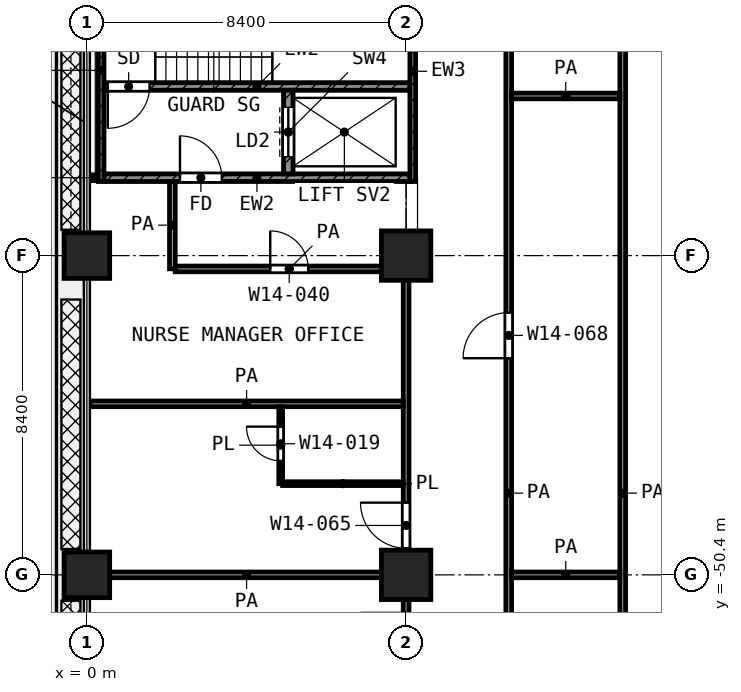
"""IFC4 building model, lengths in metres.
Left out: names, types, materials, properties, quantities, classifications, styles, units other than length and angle.
Written with IfcOpenShell. Run it as: python <this file> out.ifc"""

import sys

from ifc_helpers import new_model, si_unit, direction, frame, frame_2d, origin, origin_2d, place, context, subcontext, project, spatial, rectangle, extrude, element, fill, save


model = new_model("IFC4")
c1 = context("Model", 3, precision=1e-05, world=origin(), true_north=direction((0.0, 1.0)))
c2 = subcontext(c1, "Body", "Model", "MODEL_VIEW")
j1 = project(units=[si_unit("LENGTHUNIT", "METRE"), si_unit("PLANEANGLEUNIT", "RADIAN")], contexts=[c1])
p1 = place(None, origin())
s1 = spatial("IfcSite", under=j1, at=p1, CompositionType="ELEMENT")
p2 = place(p1, origin())
s2 = spatial("IfcBuilding", under=s1, at=p2, CompositionType="ELEMENT")
p3 = place(p2, frame((0.0, 0.0, 64.4)))
s3 = spatial("IfcBuildingStorey", under=s2, at=p3, CompositionType="ELEMENT", Elevation=64.4)
p4 = place(p3, frame((0.0, -42.0, 0.0), z_axis=(0.0, 0.0, 1.0), x_axis=(1.0, 0.0, 0.0)))
e1 = element("IfcColumn", 1, at=p4, inside=s3, PredefinedType="COLUMN", context=c2, shape_type="SweptSolid", body=[
    extrude(rectangle(XDim=1.2, YDim=1.2, at=origin_2d()), origin(), (0.0, 0.0, 1.0), 4.2),
])
p5 = place(p3, frame((8.4, -42.0, 0.0), z_axis=(0.0, 0.0, 1.0), x_axis=(1.0, 0.0, 0.0)))
e2 = element("IfcColumn", 2, at=p5, inside=s3, PredefinedType="COLUMN", context=c2, shape_type="SweptSolid", body=[
    extrude(rectangle(XDim=1.3, YDim=1.3, at=origin_2d()), origin(), (0.0, 0.0, 1.0), 4.2),
])
p6 = place(p3, frame((0.0, -50.4, 0.0), z_axis=(0.0, 0.0, 1.0), x_axis=(1.0, 0.0, 0.0)))
e3 = element("IfcColumn", 3, at=p6, inside=s3, PredefinedType="COLUMN", context=c2, shape_type="SweptSolid", body=[
    extrude(rectangle(XDim=1.2, YDim=1.2, at=origin_2d()), origin(), (0.0, 0.0, 1.0), 4.2),
])
p7 = place(p3, frame((8.4, -50.4, 0.0), z_axis=(0.0, 0.0, 1.0), x_axis=(1.0, 0.0, 0.0)))
e4 = element("IfcColumn", 4, at=p7, inside=s3, PredefinedType="COLUMN", context=c2, shape_type="SweptSolid", body=[
    extrude(rectangle(XDim=1.3, YDim=1.3, at=origin_2d()), origin(), (0.0, 0.0, 1.0), 4.2),
])
p8 = place(p3, frame((0.375, -40.05, 0.0), z_axis=(0.0, 0.0, 1.0), x_axis=(0.0, 1.0, 0.0)))
e5 = element("IfcWall", 5, at=p8, inside=s3, PredefinedType="SHEAR", context=c2, shape_type="SweptSolid", body=[
    extrude(rectangle(XDim=5.85, YDim=0.15, at=frame_2d((2.925, 0.0))), origin(), (0.0, 0.0, 1.0), 3.9),
])
p9 = place(p3, frame((8.575, -40.05, 0.0), z_axis=(0.0, 0.0, 1.0), x_axis=(0.0, 1.0, 0.0)))
e6 = element("IfcWall", 6, at=p9, inside=s3, PredefinedType="SHEAR", context=c2, shape_type="SweptSolid", body=[
    extrude(rectangle(XDim=5.8, YDim=0.15, at=frame_2d((2.9, 0.0))), origin(), (0.0, 0.0, 1.0), 3.9),
])
p10 = place(p3, frame((0.45, -37.55, 0.0), z_axis=(0.0, 0.0, 1.0), x_axis=(1.0, 0.0, 0.0)))
e7 = element("IfcWall", 7, at=p10, inside=s3, PredefinedType="SHEAR", context=c2, shape_type="SweptSolid", body=[
    extrude(rectangle(XDim=8.05, YDim=0.2, at=frame_2d((4.025, 0.0))), origin(), (0.0, 0.0, 1.0), 3.9),
])
p11 = place(p10, frame((0.1, 0.0, 0.0)))
e8 = element("IfcOpeningElement", 8, at=p11, cuts=e7, PredefinedType="OPENING", context=c2, shape_type="SweptSolid", body=[
    extrude(rectangle(XDim=1.1, YDim=2.1, at=frame_2d((0.55, 1.05))), frame((0.0, 0.11, 0.0), z_axis=(0.0, -1.0, 0.0), x_axis=(1.0, 0.0, 0.0)), (0.0, 0.0, 1.0), 0.22),
])
p12 = place(p3, frame((0.45, -39.95, 0.0), z_axis=(0.0, 0.0, 1.0), x_axis=(1.0, 0.0, 0.0)))
e9 = element("IfcWall", 9, at=p12, inside=s3, PredefinedType="SHEAR", context=c2, shape_type="SweptSolid", body=[
    extrude(rectangle(XDim=8.05, YDim=0.2, at=frame_2d((4.025, 0.0))), origin(), (0.0, 0.0, 1.0), 3.9),
])
p13 = place(p12, frame((2.0, 0.0, 0.0)))
e10 = element("IfcOpeningElement", 10, at=p13, cuts=e9, PredefinedType="OPENING", context=c2, shape_type="SweptSolid", body=[
    extrude(rectangle(XDim=1.1, YDim=2.1, at=frame_2d((0.55, 1.05))), frame((0.0, 0.11, 0.0), z_axis=(0.0, -1.0, 0.0), x_axis=(1.0, 0.0, 0.0)), (0.0, 0.0, 1.0), 0.22),
])
p14 = place(p3, frame((5.3, -39.85, 0.0), z_axis=(0.0, 0.0, 1.0), x_axis=(0.0, 1.0, 0.0)))
e11 = element("IfcWall", 11, at=p14, inside=s3, PredefinedType="SHEAR", context=c2, shape_type="SweptSolid", body=[
    extrude(rectangle(XDim=2.2, YDim=0.25, at=frame_2d((1.1, 0.0))), origin(), (0.0, 0.0, 1.0), 3.9),
])
p15 = place(p14, frame((0.45, 0.0, 0.0)))
e12 = element("IfcOpeningElement", 12, at=p15, cuts=e11, PredefinedType="OPENING", context=c2, shape_type="SweptSolid", body=[
    extrude(rectangle(XDim=1.3, YDim=2.1, at=frame_2d((0.65, 1.05))), frame((0.0, 0.135, 0.0), z_axis=(0.0, -1.0, 0.0), x_axis=(1.0, 0.0, 0.0)), (0.0, 0.0, 1.0), 0.27),
])
p16 = place(p3, frame((5.15, -48.0, 0.0), z_axis=(0.0, 0.0, 1.0), x_axis=(1.0, 0.0, 0.0)))
e13 = element("IfcWall", 13, at=p16, inside=s3, PredefinedType="PARTITIONING", context=c2, shape_type="SweptSolid", body=[
    extrude(rectangle(XDim=3.175, YDim=0.1, at=frame_2d((1.587, 0.0))), origin(), (0.0, 0.0, 1.0), 3.9),
])
p17 = place(p3, frame((5.1, -48.0, 0.0), z_axis=(0.0, 0.0, 1.0), x_axis=(0.0, 1.0, 0.0)))
e14 = element("IfcWall", 14, at=p17, inside=s3, PredefinedType="PARTITIONING", context=c2, shape_type="SweptSolid", body=[
    extrude(rectangle(XDim=2.025, YDim=0.1, at=frame_2d((1.012, 0.0))), origin(), (0.0, 0.0, 1.0), 3.9),
])
p18 = place(p17, frame((0.6, 0.0, 0.0)))
e15 = element("IfcOpeningElement", 15, at=p18, cuts=e14, PredefinedType="OPENING", context=c2, shape_type="SweptSolid", body=[
    extrude(rectangle(XDim=0.9, YDim=2.1, at=frame_2d((0.45, 1.05))), frame((0.0, 0.06, 0.0), z_axis=(0.0, -1.0, 0.0), x_axis=(1.0, 0.0, 0.0)), (0.0, 0.0, 1.0), 0.12),
])
p19 = place(p3, frame((0.08, -50.4, 0.0), z_axis=(0.0, 0.0, 1.0), x_axis=(1.0, 0.0, 0.0)))
e16 = element("IfcWall", 16, at=p19, inside=s3, PredefinedType="PARTITIONING", context=c2, shape_type="SweptSolid", body=[
    extrude(rectangle(XDim=8.245, YDim=0.15, at=frame_2d((4.123, 0.0))), origin(), (0.0, 0.0, 1.0), 3.9),
])
p20 = place(p3, frame((11.175, -50.4, 0.0), z_axis=(0.0, 0.0, 1.0), x_axis=(1.0, 0.0, 0.0)))
e17 = element("IfcWall", 17, at=p20, inside=s3, PredefinedType="PARTITIONING", context=c2, shape_type="SweptSolid", body=[
    extrude(rectangle(XDim=2.85, YDim=0.15, at=frame_2d((1.425, 0.0))), origin(), (0.0, 0.0, 1.0), 3.9),
])
p21 = place(p3, frame((0.08, -45.9, 0.0), z_axis=(0.0, 0.0, 1.0), x_axis=(1.0, 0.0, 0.0)))
e18 = element("IfcWall", 18, at=p21, inside=s3, PredefinedType="PARTITIONING", context=c2, shape_type="SweptSolid", body=[
    extrude(rectangle(XDim=8.245, YDim=0.15, at=frame_2d((4.123, 0.0))), origin(), (0.0, 0.0, 1.0), 3.9),
])
p22 = place(p3, frame((2.326, -42.35, 0.0), z_axis=(0.0, 0.0, 1.0), x_axis=(1.0, 0.0, 0.0)))
e19 = element("IfcWall", 19, at=p22, inside=s3, PredefinedType="PARTITIONING", context=c2, shape_type="SweptSolid", body=[
    extrude(rectangle(XDim=5.999, YDim=0.15, at=frame_2d((3.0, 0.0))), origin(), (0.0, 0.0, 1.0), 3.9),
])
p23 = place(p22, frame((2.499, 0.0, 0.0)))
e20 = element("IfcOpeningElement", 20, at=p23, cuts=e19, PredefinedType="OPENING", context=c2, shape_type="SweptSolid", body=[
    extrude(rectangle(XDim=1.0, YDim=2.1, at=frame_2d((0.5, 1.05))), frame((0.0, 0.085, 0.0), z_axis=(0.0, -1.0, 0.0), x_axis=(1.0, 0.0, 0.0)), (0.0, 0.0, 1.0), 0.17),
])
p24 = place(p3, frame((0.08, -39.95, 0.0), z_axis=(0.0, 0.0, 1.0), x_axis=(1.0, 0.0, 0.0)))
e21 = element("IfcWall", 21, at=p24, inside=s3, PredefinedType="PARTITIONING", context=c2, shape_type="SweptSolid", body=[
    extrude(rectangle(XDim=0.19, YDim=0.15, at=frame_2d((0.095, 0.0))), origin(), (0.0, 0.0, 1.0), 3.9),
])
p25 = place(p3, frame((11.175, -37.8, 0.0), z_axis=(0.0, 0.0, 1.0), x_axis=(1.0, 0.0, 0.0)))
e22 = element("IfcWall", 22, at=p25, inside=s3, PredefinedType="PARTITIONING", context=c2, shape_type="SweptSolid", body=[
    extrude(rectangle(XDim=2.85, YDim=0.15, at=frame_2d((1.425, 0.0))), origin(), (0.0, 0.0, 1.0), 3.9),
])
p26 = place(p3, frame((2.25, -42.348, 0.0), z_axis=(0.0, 0.0, 1.0), x_axis=(0.0, 1.0, 0.0)))
e23 = element("IfcWall", 23, at=p26, inside=s3, PredefinedType="PARTITIONING", context=c2, shape_type="SweptSolid", body=[
    extrude(rectangle(XDim=2.298, YDim=0.15, at=frame_2d((1.149, 0.0))), origin(), (0.0, 0.0, 1.0), 3.9),
])
p27 = place(p3, frame((8.4, -71.32, 0.0), z_axis=(0.0, 0.0, 1.0), x_axis=(0.0, 1.0, 0.0)))
e24 = element("IfcWall", 24, at=p27, inside=s3, PredefinedType="PARTITIONING", context=c2, shape_type="SweptSolid", body=[
    extrude(rectangle(XDim=28.97, YDim=0.15, at=frame_2d((14.485, 0.0))), origin(), (0.0, 0.0, 1.0), 3.9),
])
p28 = place(p27, frame((21.62, 0.0, 0.0)))
e25 = element("IfcOpeningElement", 25, at=p28, cuts=e24, PredefinedType="OPENING", context=c2, shape_type="SweptSolid", body=[
    extrude(rectangle(XDim=1.2, YDim=2.1, at=frame_2d((0.6, 1.05))), frame((0.0, 0.085, 0.0), z_axis=(0.0, -1.0, 0.0), x_axis=(1.0, 0.0, 0.0)), (0.0, 0.0, 1.0), 0.17),
])
p29 = place(p27, frame((18.72, 0.0, 0.0)))
e26 = element("IfcOpeningElement", 26, at=p29, cuts=e24, PredefinedType="OPENING", context=c2, shape_type="SweptSolid", body=[
    extrude(rectangle(XDim=1.2, YDim=2.1, at=frame_2d((0.6, 1.05))), frame((0.0, 0.085, 0.0), z_axis=(0.0, -1.0, 0.0), x_axis=(1.0, 0.0, 0.0)), (0.0, 0.0, 1.0), 0.17),
])
p30 = place(p27, frame((10.12, 0.0, 0.0)))
e27 = element("IfcOpeningElement", 27, at=p30, cuts=e24, PredefinedType="OPENING", context=c2, shape_type="SweptSolid", body=[
    extrude(rectangle(XDim=1.2, YDim=2.1, at=frame_2d((0.6, 1.05))), frame((0.0, 0.085, 0.0), z_axis=(0.0, -1.0, 0.0), x_axis=(1.0, 0.0, 0.0)), (0.0, 0.0, 1.0), 0.17),
])
p31 = place(p27, frame((13.22, 0.0, 0.0)))
e28 = element("IfcOpeningElement", 28, at=p31, cuts=e24, PredefinedType="OPENING", context=c2, shape_type="SweptSolid", body=[
    extrude(rectangle(XDim=0.9, YDim=2.1, at=frame_2d((0.45, 1.05))), frame((0.0, 0.085, 0.0), z_axis=(0.0, -1.0, 0.0), x_axis=(1.0, 0.0, 0.0)), (0.0, 0.0, 1.0), 0.17),
])
p32 = place(p27, frame((6.02, 0.0, 0.0)))
e29 = element("IfcOpeningElement", 29, at=p32, cuts=e24, PredefinedType="OPENING", context=c2, shape_type="SweptSolid", body=[
    extrude(rectangle(XDim=1.0, YDim=2.1, at=frame_2d((0.5, 1.05))), frame((0.0, 0.085, 0.0), z_axis=(0.0, -1.0, 0.0), x_axis=(1.0, 0.0, 0.0)), (0.0, 0.0, 1.0), 0.17),
])
p33 = place(p27, frame((1.52, 0.0, 0.0)))
e30 = element("IfcOpeningElement", 30, at=p33, cuts=e24, PredefinedType="OPENING", context=c2, shape_type="SweptSolid", body=[
    extrude(rectangle(XDim=1.0, YDim=2.1, at=frame_2d((0.5, 1.05))), frame((0.0, 0.085, 0.0), z_axis=(0.0, -1.0, 0.0), x_axis=(1.0, 0.0, 0.0)), (0.0, 0.0, 1.0), 0.17),
])
p34 = place(p3, frame((11.1, -67.1, 0.0), z_axis=(0.0, 0.0, 1.0), x_axis=(0.0, 1.0, 0.0)))
e31 = element("IfcWall", 31, at=p34, inside=s3, PredefinedType="PARTITIONING", context=c2, shape_type="SweptSolid", body=[
    extrude(rectangle(XDim=37.7, YDim=0.15, at=frame_2d((18.85, 0.0))), origin(), (0.0, 0.0, 1.0), 3.9),
])
p35 = place(p34, frame((35.1, 0.0, 0.0)))
e32 = element("IfcOpeningElement", 32, at=p35, cuts=e31, PredefinedType="OPENING", context=c2, shape_type="SweptSolid", body=[
    extrude(rectangle(XDim=1.0, YDim=2.1, at=frame_2d((0.5, 1.05))), frame((0.0, 0.085, 0.0), z_axis=(0.0, -1.0, 0.0), x_axis=(1.0, 0.0, 0.0)), (0.0, 0.0, 1.0), 0.17),
])
p36 = place(p34, frame((22.4, 0.0, 0.0)))
e33 = element("IfcOpeningElement", 33, at=p36, cuts=e31, PredefinedType="OPENING", context=c2, shape_type="SweptSolid", body=[
    extrude(rectangle(XDim=1.2, YDim=2.1, at=frame_2d((0.6, 1.05))), frame((0.0, 0.085, 0.0), z_axis=(0.0, -1.0, 0.0), x_axis=(1.0, 0.0, 0.0)), (0.0, 0.0, 1.0), 0.17),
])
p37 = place(p34, frame((9.65, 0.0, 0.0)))
e34 = element("IfcOpeningElement", 34, at=p37, cuts=e31, PredefinedType="OPENING", context=c2, shape_type="SweptSolid", body=[
    extrude(rectangle(XDim=1.2, YDim=2.1, at=frame_2d((0.6, 1.05))), frame((0.0, 0.085, 0.0), z_axis=(0.0, -1.0, 0.0), x_axis=(1.0, 0.0, 0.0)), (0.0, 0.0, 1.0), 0.17),
])
p38 = place(p34, frame((1.35, 0.0, 0.0)))
e35 = element("IfcOpeningElement", 35, at=p38, cuts=e31, PredefinedType="OPENING", context=c2, shape_type="SweptSolid", body=[
    extrude(rectangle(XDim=1.0, YDim=2.1, at=frame_2d((0.5, 1.05))), frame((0.0, 0.085, 0.0), z_axis=(0.0, -1.0, 0.0), x_axis=(1.0, 0.0, 0.0)), (0.0, 0.0, 1.0), 0.17),
])
p39 = place(p3, frame((14.1, -67.1, 0.0), z_axis=(0.0, 0.0, 1.0), x_axis=(0.0, 1.0, 0.0)))
e36 = element("IfcWall", 36, at=p39, inside=s3, PredefinedType="PARTITIONING", context=c2, shape_type="SweptSolid", body=[
    extrude(rectangle(XDim=37.7, YDim=0.15, at=frame_2d((18.85, 0.0))), origin(), (0.0, 0.0, 1.0), 3.9),
])
p40 = place(p39, frame((30.9, 0.0, 0.0)))
e37 = element("IfcOpeningElement", 37, at=p40, cuts=e36, PredefinedType="OPENING", context=c2, shape_type="SweptSolid", body=[
    extrude(rectangle(XDim=1.0, YDim=2.1, at=frame_2d((0.5, 1.05))), frame((0.0, 0.085, 0.0), z_axis=(0.0, -1.0, 0.0), x_axis=(1.0, 0.0, 0.0)), (0.0, 0.0, 1.0), 0.17),
])
p41 = place(p11, frame((1.1, 0.0, 0.0), z_axis=(0.0, 0.0, 1.0), x_axis=(-1.0, 0.0, 0.0)))
e38 = element("IfcDoor", 38, at=p41, inside=s3, OperationType="SINGLE_SWING_LEFT", PredefinedType="DOOR", context=c2, shape_type="SweptSolid", body=[
    extrude(rectangle(XDim=1.1, YDim=2.1, at=frame_2d((0.55, 1.05))), frame((0.0, 0.025, 0.0), z_axis=(0.0, -1.0, 0.0), x_axis=(1.0, 0.0, 0.0)), (0.0, 0.0, 1.0), 0.05),
])
fill(e8, e38)
p42 = place(p15, origin())
e39 = element("IfcDoor", 39, at=p42, inside=s3, OperationType="DOUBLE_DOOR_SLIDING", PredefinedType="DOOR", context=c2, shape_type="SweptSolid", body=[
    extrude(rectangle(XDim=1.3, YDim=2.1, at=frame_2d((0.65, 1.05))), frame((0.0, 0.025, 0.0), z_axis=(0.0, -1.0, 0.0), x_axis=(1.0, 0.0, 0.0)), (0.0, 0.0, 1.0), 0.05),
])
fill(e12, e39)
p43 = place(p13, origin())
e40 = element("IfcDoor", 40, at=p43, inside=s3, OperationType="SINGLE_SWING_LEFT", PredefinedType="DOOR", context=c2, shape_type="SweptSolid", body=[
    extrude(rectangle(XDim=1.1, YDim=2.1, at=frame_2d((0.55, 1.05))), frame((0.0, 0.025, 0.0), z_axis=(0.0, -1.0, 0.0), x_axis=(1.0, 0.0, 0.0)), (0.0, 0.0, 1.0), 0.05),
])
fill(e10, e40)
p44 = place(p23, origin())
e41 = element("IfcDoor", 41, at=p44, inside=s3, OperationType="SINGLE_SWING_LEFT", PredefinedType="DOOR", context=c2, shape_type="SweptSolid", body=[
    extrude(rectangle(XDim=1.0, YDim=2.1, at=frame_2d((0.5, 1.05))), frame((0.0, 0.025, 0.0), z_axis=(0.0, -1.0, 0.0), x_axis=(1.0, 0.0, 0.0)), (0.0, 0.0, 1.0), 0.05),
])
fill(e20, e41)
p45 = place(p28, origin())
e42 = element("IfcDoor", 42, at=p45, inside=s3, OperationType="SINGLE_SWING_RIGHT", PredefinedType="DOOR", context=c2, shape_type="SweptSolid", body=[
    extrude(rectangle(XDim=1.2, YDim=2.1, at=frame_2d((0.6, 1.05))), frame((0.0, 0.025, 0.0), z_axis=(0.0, -1.0, 0.0), x_axis=(1.0, 0.0, 0.0)), (0.0, 0.0, 1.0), 0.05),
])
fill(e25, e42)
p46 = place(p18, origin())
e43 = element("IfcDoor", 43, at=p46, inside=s3, OperationType="SINGLE_SWING_RIGHT", PredefinedType="DOOR", context=c2, shape_type="SweptSolid", body=[
    extrude(rectangle(XDim=0.9, YDim=2.1, at=frame_2d((0.45, 1.05))), frame((0.0, 0.025, 0.0), z_axis=(0.0, -1.0, 0.0), x_axis=(1.0, 0.0, 0.0)), (0.0, 0.0, 1.0), 0.05),
])
fill(e15, e43)
p47 = place(p36, origin())
e44 = element("IfcDoor", 44, at=p47, inside=s3, OperationType="SINGLE_SWING_LEFT", PredefinedType="DOOR", context=c2, shape_type="SweptSolid", body=[
    extrude(rectangle(XDim=1.2, YDim=2.1, at=frame_2d((0.6, 1.05))), frame((0.0, 0.025, 0.0), z_axis=(0.0, -1.0, 0.0), x_axis=(1.0, 0.0, 0.0)), (0.0, 0.0, 1.0), 0.05),
])
fill(e33, e44)
save(model, sys.argv[1])
